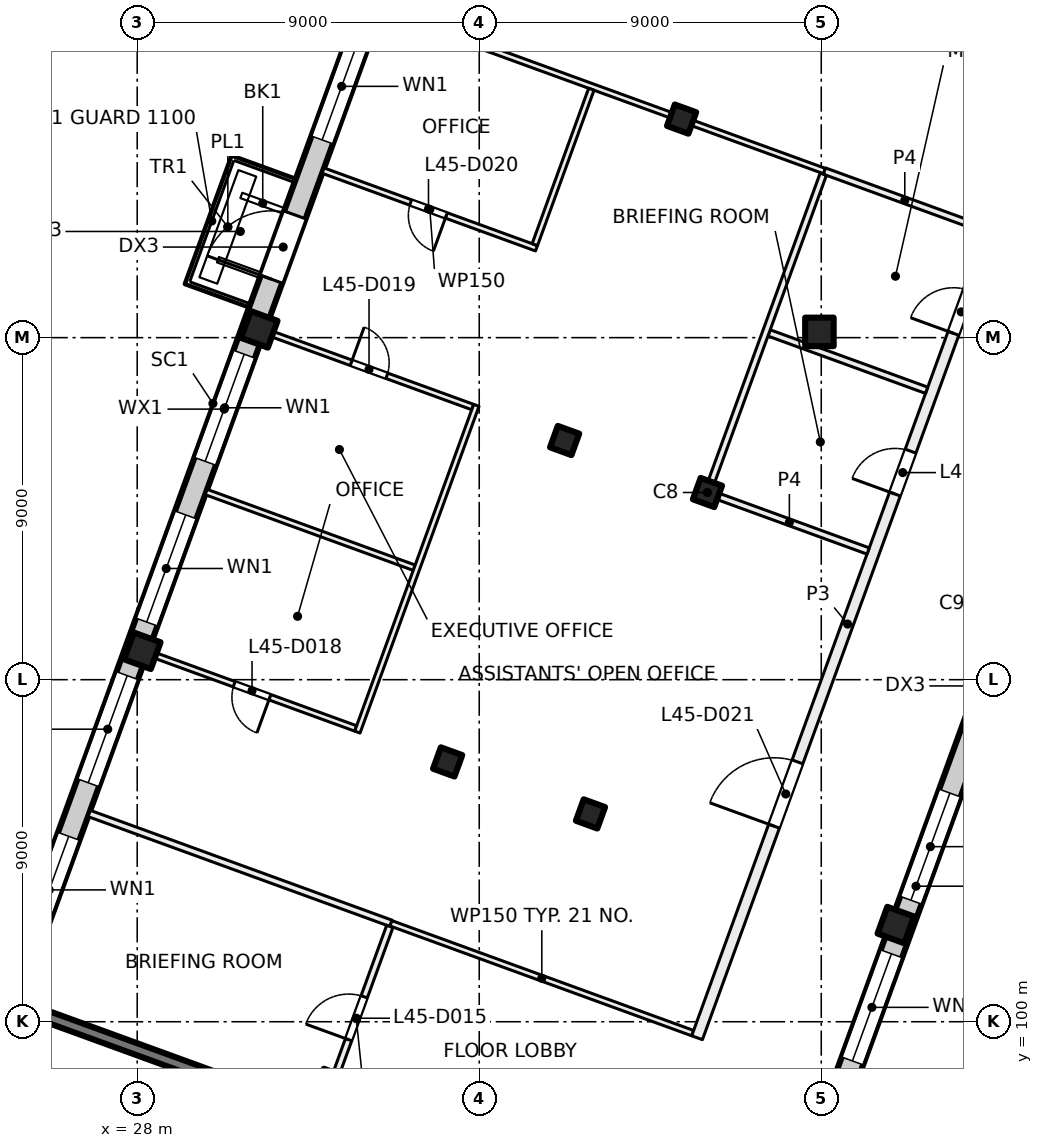
"""IFC4 building model, lengths in metres.
Left out: names, types, materials, properties, quantities, classifications, styles, units other than length and angle.
Written with IfcOpenShell. Run it as: python <this file> out.ifc"""

import sys

from ifc_helpers import new_model, si_unit, direction, frame, frame_2d, origin, origin_2d, place, context, subcontext, project, spatial, rectangle, extrude, element, fill, save


model = new_model("IFC4")
c1 = context("Model", 3, precision=1e-05, world=origin(), true_north=direction((0.0, 1.0)))
c2 = subcontext(c1, "Body", "Model", "MODEL_VIEW")
j1 = project(units=[si_unit("LENGTHUNIT", "METRE"), si_unit("PLANEANGLEUNIT", "RADIAN")], contexts=[c1])
p1 = place(None, origin())
s1 = spatial("IfcSite", under=j1, at=p1, CompositionType="ELEMENT")
p2 = place(p1, origin())
s2 = spatial("IfcBuilding", under=s1, at=p2, CompositionType="ELEMENT")
p3 = place(p2, frame((0.0, 0.0, 192.0)))
s3 = spatial("IfcBuildingStorey", under=s2, at=p3, CompositionType="ELEMENT", Elevation=192.0)
p4 = place(p3, frame((45.952, 118.152, 0.0), z_axis=(0.0, 0.0, 1.0), x_axis=(1.0, 0.0, 0.0)))
e1 = element("IfcColumn", 1, at=p4, inside=s3, PredefinedType="COLUMN", context=c2, shape_type="SweptSolid", body=[
    extrude(rectangle(XDim=0.75, YDim=0.75, at=origin_2d()), origin(), (0.0, 0.0, 1.0), 4.0),
])
for number, where, z_axis, x_axis in (
    (2, (43.006, 113.925, 0.0), (0.0, 0.0, 1.0), (-0.342, -0.94, 0.0)),
    (3, (39.927, 105.468, 0.0), (0.0, 0.0, 1.0), (-0.342, -0.94, 0.0)),
    (4, (42.325, 123.751, 0.0), (0.0, 0.0, 1.0), (-0.342, -0.94, 0.0)),
    (5, (39.247, 115.293, 0.0), (0.0, 0.0, 1.0), (-0.342, -0.94, 0.0)),
    (6, (36.169, 106.836, 0.0), (0.0, 0.0, 1.0), (-0.342, -0.94, 0.0)),
):
    element("IfcColumn", number, at=place(p3, frame(where, z_axis=z_axis, x_axis=x_axis)), inside=s3, PredefinedType="COLUMN", context=c2, shape_type="SweptSolid", body=[
        extrude(rectangle(XDim=0.6, YDim=0.6, at=origin_2d()), origin(), (0.0, 0.0, 1.0), 4.0),
    ])
for number, where, z_axis, x_axis in (
    (7, (47.962, 102.544, 0.0), (0.0, 0.0, 1.0), (-0.342, -0.94, 0.0)),
    (8, (31.212, 118.218, 0.0), (0.0, 0.0, 1.0), (-0.342, -0.94, 0.0)),
    (9, (28.134, 109.76, 0.0), (0.0, 0.0, 1.0), (-0.342, -0.94, 0.0)),
):
    element("IfcColumn", number, at=place(p3, frame(where, z_axis=z_axis, x_axis=x_axis)), inside=s3, PredefinedType="COLUMN", context=c2, shape_type="SweptSolid", body=[
        extrude(rectangle(XDim=0.75, YDim=0.75, at=origin_2d()), origin(), (0.0, 0.0, 1.0), 4.0),
    ])
p5 = place(p3, frame((32.971, 97.465, 0.0), z_axis=(0.0, 0.0, 1.0), x_axis=(-0.939695066972, 0.34201342241, 0.0)))
e10 = element("IfcWall", 10, at=p5, inside=s3, PredefinedType="SHEAR", context=c2, shape_type="SweptSolid", body=[
    extrude(rectangle(XDim=8.7, YDim=0.3, at=frame_2d((4.35, 0.0))), origin(), (0.0, 0.0, 1.0), 4.0),
])
p6 = place(p3, frame((52.212, 113.783, 0.0), z_axis=(0.0, 0.0, 1.0), x_axis=(-0.34202521188, -0.939690775968, 0.0)))
e11 = element("IfcWall", 11, at=p6, inside=s3, PredefinedType="SOLIDWALL", context=c2, shape_type="SweptSolid", body=[
    extrude(rectangle(XDim=21.745, YDim=0.6, at=frame_2d((10.873, 0.0))), origin(), (0.0, 0.0, 1.0), 3.625),
])
p7 = place(p6, frame((4.365, 0.0, 0.0)))
e12 = element("IfcOpeningElement", 12, at=p7, cuts=e11, PredefinedType="OPENING", context=c2, shape_type="SweptSolid", body=[
    extrude(rectangle(XDim=1.8, YDim=2.4, at=frame_2d((0.9, 1.2))), frame((0.0, 0.31, 0.0), z_axis=(0.0, -1.0, 0.0), x_axis=(1.0, 0.0, 0.0)), (0.0, 0.0, 1.0), 0.62),
])
p8 = place(p6, frame((8.265, 0.0, 0.9)))
e13 = element("IfcOpeningElement", 13, at=p8, cuts=e11, PredefinedType="OPENING", context=c2, shape_type="SweptSolid", body=[
    extrude(rectangle(XDim=3.0, YDim=2.4, at=frame_2d((1.5, 1.2))), frame((0.0, 0.31, 0.0), z_axis=(0.0, -1.0, 0.0), x_axis=(1.0, 0.0, 0.0)), (0.0, 0.0, 1.0), 0.62),
])
p9 = place(p6, frame((12.765, 0.0, 0.9)))
e14 = element("IfcOpeningElement", 14, at=p9, cuts=e11, PredefinedType="OPENING", context=c2, shape_type="SweptSolid", body=[
    extrude(rectangle(XDim=3.0, YDim=2.4, at=frame_2d((1.5, 1.2))), frame((0.0, 0.31, 0.0), z_axis=(0.0, -1.0, 0.0), x_axis=(1.0, 0.0, 0.0)), (0.0, 0.0, 1.0), 0.62),
])
p10 = place(p6, frame((17.265, 0.0, 0.9)))
e15 = element("IfcOpeningElement", 15, at=p10, cuts=e11, PredefinedType="OPENING", context=c2, shape_type="SweptSolid", body=[
    extrude(rectangle(XDim=3.0, YDim=2.4, at=frame_2d((1.5, 1.2))), frame((0.0, 0.31, 0.0), z_axis=(0.0, -1.0, 0.0), x_axis=(1.0, 0.0, 0.0)), (0.0, 0.0, 1.0), 0.62),
])
p11 = place(p3, frame((24.666, 100.669, 0.0), z_axis=(0.0, 0.0, 1.0), x_axis=(0.34201964167, 0.939692803373, 0.0)))
e16 = element("IfcWall", 16, at=p11, inside=s3, PredefinedType="SOLIDWALL", context=c2, shape_type="SweptSolid", body=[
    extrude(rectangle(XDim=32.884, YDim=0.6, at=frame_2d((16.442, 0.0))), origin(), (0.0, 0.0, 1.0), 3.625),
])
p12 = place(p11, frame((1.48, 0.0, 0.9)))
e17 = element("IfcOpeningElement", 17, at=p12, cuts=e16, PredefinedType="OPENING", context=c2, shape_type="SweptSolid", body=[
    extrude(rectangle(XDim=3.0, YDim=2.4, at=frame_2d((1.5, 1.2))), frame((0.0, 0.31, 0.0), z_axis=(0.0, -1.0, 0.0), x_axis=(1.0, 0.0, 0.0)), (0.0, 0.0, 1.0), 0.62),
])
p13 = place(p11, frame((5.98, 0.0, 0.9)))
e18 = element("IfcOpeningElement", 18, at=p13, cuts=e16, PredefinedType="OPENING", context=c2, shape_type="SweptSolid", body=[
    extrude(rectangle(XDim=3.0, YDim=2.4, at=frame_2d((1.5, 1.2))), frame((0.0, 0.31, 0.0), z_axis=(0.0, -1.0, 0.0), x_axis=(1.0, 0.0, 0.0)), (0.0, 0.0, 1.0), 0.62),
])
p14 = place(p11, frame((10.48, 0.0, 0.9)))
e19 = element("IfcOpeningElement", 19, at=p14, cuts=e16, PredefinedType="OPENING", context=c2, shape_type="SweptSolid", body=[
    extrude(rectangle(XDim=3.0, YDim=2.4, at=frame_2d((1.5, 1.2))), frame((0.0, 0.31, 0.0), z_axis=(0.0, -1.0, 0.0), x_axis=(1.0, 0.0, 0.0)), (0.0, 0.0, 1.0), 0.62),
])
p15 = place(p11, frame((14.98, 0.0, 0.9)))
e20 = element("IfcOpeningElement", 20, at=p15, cuts=e16, PredefinedType="OPENING", context=c2, shape_type="SweptSolid", body=[
    extrude(rectangle(XDim=3.0, YDim=2.4, at=frame_2d((1.5, 1.2))), frame((0.0, 0.31, 0.0), z_axis=(0.0, -1.0, 0.0), x_axis=(1.0, 0.0, 0.0)), (0.0, 0.0, 1.0), 0.62),
])
p16 = place(p11, frame((20.08, 0.0, 0.0)))
e21 = element("IfcOpeningElement", 21, at=p16, cuts=e16, PredefinedType="OPENING", context=c2, shape_type="SweptSolid", body=[
    extrude(rectangle(XDim=1.8, YDim=2.4, at=frame_2d((0.9, 1.2))), frame((0.0, 0.31, 0.0), z_axis=(0.0, -1.0, 0.0), x_axis=(1.0, 0.0, 0.0)), (0.0, 0.0, 1.0), 0.62),
])
p17 = place(p11, frame((23.98, 0.0, 0.9)))
e22 = element("IfcOpeningElement", 22, at=p17, cuts=e16, PredefinedType="OPENING", context=c2, shape_type="SweptSolid", body=[
    extrude(rectangle(XDim=3.0, YDim=2.4, at=frame_2d((1.5, 1.2))), frame((0.0, 0.31, 0.0), z_axis=(0.0, -1.0, 0.0), x_axis=(1.0, 0.0, 0.0)), (0.0, 0.0, 1.0), 0.62),
])
p18 = place(p11, frame((28.48, 0.0, 0.9)))
e23 = element("IfcOpeningElement", 23, at=p18, cuts=e16, PredefinedType="OPENING", context=c2, shape_type="SweptSolid", body=[
    extrude(rectangle(XDim=3.0, YDim=2.4, at=frame_2d((1.5, 1.2))), frame((0.0, 0.31, 0.0), z_axis=(0.0, -1.0, 0.0), x_axis=(1.0, 0.0, 0.0)), (0.0, 0.0, 1.0), 0.62),
])
p19 = place(p3, frame((26.736, 105.48, 0.0), z_axis=(0.0, 0.0, 1.0), x_axis=(0.939706509432, -0.341981982173, 0.0)))
e24 = element("IfcWall", 24, at=p19, inside=s3, PredefinedType="PARTITIONING", context=c2, shape_type="SweptSolid", body=[
    extrude(rectangle(XDim=8.45, YDim=0.175, at=frame_2d((4.225, 0.0))), origin(), (0.0, 0.0, 1.0), 3.625),
])
p20 = place(p3, frame((29.814, 113.938, 0.0), z_axis=(0.0, 0.0, 1.0), x_axis=(0.939738354986, -0.341894463495, 0.0)))
e25 = element("IfcWall", 25, at=p20, inside=s3, PredefinedType="PARTITIONING", context=c2, shape_type="SweptSolid", body=[
    extrude(rectangle(XDim=5.826, YDim=0.15, at=frame_2d((2.913, 0.0))), origin(), (0.0, 0.0, 1.0), 3.625),
])
p21 = place(p3, frame((31.353, 118.166, 0.0), z_axis=(0.0, 0.0, 1.0), x_axis=(0.939733456466, -0.341907927371, 0.0)))
e26 = element("IfcWall", 26, at=p21, inside=s3, PredefinedType="PARTITIONING", context=c2, shape_type="SweptSolid", body=[
    extrude(rectangle(XDim=5.826, YDim=0.15, at=frame_2d((2.913, 0.0))), origin(), (0.0, 0.0, 1.0), 3.625),
])
p22 = place(p21, frame((2.423, 0.0, 0.0)))
e27 = element("IfcOpeningElement", 27, at=p22, cuts=e26, PredefinedType="OPENING", context=c2, shape_type="SweptSolid", body=[
    extrude(rectangle(XDim=1.0, YDim=2.1, at=frame_2d((0.5, 1.05))), frame((0.0, 0.085, 0.0), z_axis=(0.0, -1.0, 0.0), x_axis=(1.0, 0.0, 0.0)), (0.0, 0.0, 1.0), 0.17),
])
p23 = place(p3, frame((33.749, 107.717, 0.0), z_axis=(0.0, 0.0, 1.0), x_axis=(-0.939718757431, 0.341948324943, 0.0)))
e28 = element("IfcWall", 28, at=p23, inside=s3, PredefinedType="PARTITIONING", context=c2, shape_type="SweptSolid", body=[
    extrude(rectangle(XDim=5.825, YDim=0.15, at=frame_2d((2.913, 0.0))), origin(), (0.0, 0.0, 1.0), 3.625),
])
p24 = place(p23, frame((2.403, 0.0, 0.0)))
e29 = element("IfcOpeningElement", 29, at=p24, cuts=e28, PredefinedType="OPENING", context=c2, shape_type="SweptSolid", body=[
    extrude(rectangle(XDim=1.0, YDim=2.1, at=frame_2d((0.5, 1.05))), frame((0.0, 0.085, 0.0), z_axis=(0.0, -1.0, 0.0), x_axis=(1.0, 0.0, 0.0)), (0.0, 0.0, 1.0), 0.17),
])
p25 = place(p3, frame((36.924, 116.218, 0.0), z_axis=(0.0, 0.0, 1.0), x_axis=(-0.342220796767, -0.939619564643, 0.0)))
e30 = element("IfcWall", 30, at=p25, inside=s3, PredefinedType="PARTITIONING", context=c2, shape_type="SweptSolid", body=[
    extrude(rectangle(XDim=9.149, YDim=0.15, at=frame_2d((4.575, 0.0))), origin(), (0.0, 0.0, 1.0), 3.625),
])
p26 = place(p3, frame((34.431, 126.624, 0.0), z_axis=(0.0, 0.0, 1.0), x_axis=(0.939703144457, -0.341991228392, 0.0)))
e31 = element("IfcWall", 31, at=p26, inside=s3, PredefinedType="PARTITIONING", context=c2, shape_type="SweptSolid", body=[
    extrude(rectangle(XDim=12.401, YDim=0.15, at=frame_2d((6.2, 0.0))), origin(), (0.0, 0.0, 1.0), 3.625),
])
p27 = place(p3, frame((32.881, 97.657, 0.0), z_axis=(0.0, 0.0, 1.0), x_axis=(0.342058204353, 0.939678766832, 0.0)))
e32 = element("IfcWall", 32, at=p27, inside=s3, PredefinedType="PARTITIONING", context=c2, shape_type="SweptSolid", body=[
    extrude(rectangle(XDim=5.163, YDim=0.175, at=frame_2d((2.581, 0.0))), origin(), (0.0, 0.0, 1.0), 3.625),
])
p28 = place(p27, frame((1.991, 0.0, 0.0)))
e33 = element("IfcOpeningElement", 33, at=p28, cuts=e32, PredefinedType="OPENING", context=c2, shape_type="SweptSolid", body=[
    extrude(rectangle(XDim=1.2, YDim=2.1, at=frame_2d((0.6, 1.05))), frame((0.0, 0.097, 0.0), z_axis=(0.0, -1.0, 0.0), x_axis=(1.0, 0.0, 0.0)), (0.0, 0.0, 1.0), 0.195),
])
p29 = place(p3, frame((34.677, 102.59, 0.0), z_axis=(0.0, 0.0, 1.0), x_axis=(0.939683705252, -0.342044637561, 0.0)))
e34 = element("IfcWall", 34, at=p29, inside=s3, PredefinedType="PARTITIONING", context=c2, shape_type="SweptSolid", body=[
    extrude(rectangle(XDim=8.45, YDim=0.15, at=frame_2d((4.225, 0.0))), origin(), (0.0, 0.0, 1.0), 3.625),
])
p30 = place(p3, frame((38.507, 120.351, 0.0), z_axis=(0.0, 0.0, 1.0), x_axis=(-0.939678850769, 0.342057973766, 0.0)))
e35 = element("IfcWall", 35, at=p30, inside=s3, PredefinedType="PARTITIONING", context=c2, shape_type="SweptSolid", body=[
    extrude(rectangle(XDim=5.975, YDim=0.15, at=frame_2d((2.988, 0.0))), origin(), (0.0, 0.0, 1.0), 3.625),
])
p31 = place(p30, frame((2.525, 0.0, 0.0)))
e36 = element("IfcOpeningElement", 36, at=p31, cuts=e35, PredefinedType="OPENING", context=c2, shape_type="SweptSolid", body=[
    extrude(rectangle(XDim=1.0, YDim=2.1, at=frame_2d((0.5, 1.05))), frame((0.0, 0.085, 0.0), z_axis=(0.0, -1.0, 0.0), x_axis=(1.0, 0.0, 0.0)), (0.0, 0.0, 1.0), 0.17),
])
p32 = place(p3, frame((39.95, 124.536, 0.0), z_axis=(0.0, 0.0, 1.0), x_axis=(-0.341783611499, -0.939778677621, 0.0)))
e37 = element("IfcWall", 37, at=p32, inside=s3, PredefinedType="PARTITIONING", context=c2, shape_type="SweptSolid", body=[
    extrude(rectangle(XDim=4.351, YDim=0.15, at=frame_2d((2.175, 0.0))), origin(), (0.0, 0.0, 1.0), 3.625),
])
p33 = place(p3, frame((42.732, 99.579, 0.0), z_axis=(0.0, 0.0, 1.0), x_axis=(0.342053589012, 0.939680446877, 0.0)))
e38 = element("IfcWall", 38, at=p33, inside=s3, PredefinedType="PARTITIONING", context=c2, shape_type="SweptSolid", body=[
    extrude(rectangle(XDim=23.166, YDim=0.3, at=frame_2d((11.583, 0.0))), origin(), (0.0, 0.0, 1.0), 3.625),
])
p34 = place(p33, frame((15.225, 0.0, 0.0)))
e39 = element("IfcOpeningElement", 39, at=p34, cuts=e38, PredefinedType="OPENING", context=c2, shape_type="SweptSolid", body=[
    extrude(rectangle(XDim=1.2, YDim=2.1, at=frame_2d((0.6, 1.05))), frame((0.0, 0.16, 0.0), z_axis=(0.0, -1.0, 0.0), x_axis=(1.0, 0.0, 0.0)), (0.0, 0.0, 1.0), 0.32),
])
p35 = place(p33, frame((19.725, 0.0, 0.0)))
e40 = element("IfcOpeningElement", 40, at=p35, cuts=e38, PredefinedType="OPENING", context=c2, shape_type="SweptSolid", body=[
    extrude(rectangle(XDim=1.2, YDim=2.1, at=frame_2d((0.6, 1.05))), frame((0.0, 0.16, 0.0), z_axis=(0.0, -1.0, 0.0), x_axis=(1.0, 0.0, 0.0)), (0.0, 0.0, 1.0), 0.32),
])
p36 = place(p33, frame((5.925, 0.0, 0.0)))
e41 = element("IfcOpeningElement", 41, at=p36, cuts=e38, PredefinedType="OPENING", context=c2, shape_type="SweptSolid", body=[
    extrude(rectangle(XDim=1.8, YDim=2.1, at=frame_2d((0.9, 1.05))), frame((0.0, 0.16, 0.0), z_axis=(0.0, -1.0, 0.0), x_axis=(1.0, 0.0, 0.0)), (0.0, 0.0, 1.0), 0.32),
])
for number, where, z_axis, x_axis in (
    (42, (43.088, 113.895, 0.0), (0.0, 0.0, 1.0), (0.94, -0.342, 0.0)),
    (43, (44.627, 118.124, 0.0), (0.0, 0.0, 1.0), (0.94, -0.342, 0.0)),
):
    element("IfcWall", number, at=place(p3, frame(where, z_axis=z_axis, x_axis=x_axis)), inside=s3, PredefinedType="PARTITIONING", context=c2, shape_type="SweptSolid", body=[
        extrude(rectangle(XDim=4.412, YDim=0.175, at=frame_2d((2.206, 0.0))), origin(), (0.0, 0.0, 1.0), 3.625),
    ])
p37 = place(p3, frame((46.054, 122.301, 0.0), z_axis=(0.0, 0.0, 1.0), x_axis=(-0.341963022424, -0.939713409128, 0.0)))
e44 = element("IfcWall", 44, at=p37, inside=s3, PredefinedType="PARTITIONING", context=c2, shape_type="SweptSolid", body=[
    extrude(rectangle(XDim=9.001, YDim=0.175, at=frame_2d((4.5, 0.0))), origin(), (0.0, 0.0, 1.0), 3.625),
])
p38 = place(p3, frame((50.312, 120.843, 0.0), z_axis=(0.0, 0.0, 1.0), x_axis=(-0.939609529273, 0.342248349154, 0.0)))
e45 = element("IfcWall", 45, at=p38, inside=s3, PredefinedType="PARTITIONING", context=c2, shape_type="SweptSolid", body=[
    extrude(rectangle(XDim=4.5, YDim=0.175, at=frame_2d((2.25, 0.0))), origin(), (0.0, 0.0, 1.0), 3.625),
])
p39 = place(p8, origin())
e46 = element("IfcWindow", 46, at=p39, inside=s3, PartitioningType="SINGLE_PANEL", PredefinedType="WINDOW", context=c2, shape_type="SweptSolid", body=[
    extrude(rectangle(XDim=3.0, YDim=2.4, at=frame_2d((1.5, 1.2))), frame((0.0, 0.03, 0.0), z_axis=(0.0, -1.0, 0.0), x_axis=(1.0, 0.0, 0.0)), (0.0, 0.0, 1.0), 0.06),
])
fill(e13, e46)
p40 = place(p9, origin())
e47 = element("IfcWindow", 47, at=p40, inside=s3, PartitioningType="SINGLE_PANEL", PredefinedType="WINDOW", context=c2, shape_type="SweptSolid", body=[
    extrude(rectangle(XDim=3.0, YDim=2.4, at=frame_2d((1.5, 1.2))), frame((0.0, 0.03, 0.0), z_axis=(0.0, -1.0, 0.0), x_axis=(1.0, 0.0, 0.0)), (0.0, 0.0, 1.0), 0.06),
])
fill(e14, e47)
p41 = place(p12, origin())
e48 = element("IfcWindow", 48, at=p41, inside=s3, PartitioningType="SINGLE_PANEL", PredefinedType="WINDOW", context=c2, shape_type="SweptSolid", body=[
    extrude(rectangle(XDim=3.0, YDim=2.4, at=frame_2d((1.5, 1.2))), frame((0.0, 0.03, 0.0), z_axis=(0.0, -1.0, 0.0), x_axis=(1.0, 0.0, 0.0)), (0.0, 0.0, 1.0), 0.06),
])
fill(e17, e48)
p42 = place(p13, origin())
e49 = element("IfcWindow", 49, at=p42, inside=s3, PartitioningType="SINGLE_PANEL", PredefinedType="WINDOW", context=c2, shape_type="SweptSolid", body=[
    extrude(rectangle(XDim=3.0, YDim=2.4, at=frame_2d((1.5, 1.2))), frame((0.0, 0.03, 0.0), z_axis=(0.0, -1.0, 0.0), x_axis=(1.0, 0.0, 0.0)), (0.0, 0.0, 1.0), 0.06),
])
fill(e18, e49)
p43 = place(p14, origin())
e50 = element("IfcWindow", 50, at=p43, inside=s3, PartitioningType="SINGLE_PANEL", PredefinedType="WINDOW", context=c2, shape_type="SweptSolid", body=[
    extrude(rectangle(XDim=3.0, YDim=2.4, at=frame_2d((1.5, 1.2))), frame((0.0, 0.03, 0.0), z_axis=(0.0, -1.0, 0.0), x_axis=(1.0, 0.0, 0.0)), (0.0, 0.0, 1.0), 0.06),
])
fill(e19, e50)
p44 = place(p15, origin())
e51 = element("IfcWindow", 51, at=p44, inside=s3, PartitioningType="SINGLE_PANEL", PredefinedType="WINDOW", context=c2, shape_type="SweptSolid", body=[
    extrude(rectangle(XDim=3.0, YDim=2.4, at=frame_2d((1.5, 1.2))), frame((0.0, 0.03, 0.0), z_axis=(0.0, -1.0, 0.0), x_axis=(1.0, 0.0, 0.0)), (0.0, 0.0, 1.0), 0.06),
])
fill(e20, e51)
p45 = place(p16, origin())
e52 = element("IfcDoor", 52, at=p45, inside=s3, OperationType="DOUBLE_DOOR_SINGLE_SWING", PredefinedType="DOOR", context=c2, shape_type="SweptSolid", body=[
    extrude(rectangle(XDim=1.8, YDim=2.4, at=frame_2d((0.9, 1.2))), frame((0.0, 0.025, 0.0), z_axis=(0.0, -1.0, 0.0), x_axis=(1.0, 0.0, 0.0)), (0.0, 0.0, 1.0), 0.05),
])
fill(e21, e52)
p46 = place(p17, origin())
e53 = element("IfcWindow", 53, at=p46, inside=s3, PartitioningType="SINGLE_PANEL", PredefinedType="WINDOW", context=c2, shape_type="SweptSolid", body=[
    extrude(rectangle(XDim=3.0, YDim=2.4, at=frame_2d((1.5, 1.2))), frame((0.0, 0.03, 0.0), z_axis=(0.0, -1.0, 0.0), x_axis=(1.0, 0.0, 0.0)), (0.0, 0.0, 1.0), 0.06),
])
fill(e22, e53)
p47 = place(p28, origin())
e54 = element("IfcDoor", 54, at=p47, inside=s3, OperationType="DOUBLE_DOOR_SINGLE_SWING", PredefinedType="DOOR", context=c2, shape_type="SweptSolid", body=[
    extrude(rectangle(XDim=1.2, YDim=2.1, at=frame_2d((0.6, 1.05))), frame((0.0, 0.025, 0.0), z_axis=(0.0, -1.0, 0.0), x_axis=(1.0, 0.0, 0.0)), (0.0, 0.0, 1.0), 0.05),
])
fill(e33, e54)
p48 = place(p34, origin())
e55 = element("IfcDoor", 55, at=p48, inside=s3, OperationType="DOUBLE_DOOR_SINGLE_SWING", PredefinedType="DOOR", context=c2, shape_type="SweptSolid", body=[
    extrude(rectangle(XDim=1.2, YDim=2.1, at=frame_2d((0.6, 1.05))), frame((0.0, 0.025, 0.0), z_axis=(0.0, -1.0, 0.0), x_axis=(1.0, 0.0, 0.0)), (0.0, 0.0, 1.0), 0.05),
])
fill(e39, e55)
p49 = place(p35, origin())
e56 = element("IfcDoor", 56, at=p49, inside=s3, OperationType="DOUBLE_DOOR_SINGLE_SWING", PredefinedType="DOOR", context=c2, shape_type="SweptSolid", body=[
    extrude(rectangle(XDim=1.2, YDim=2.1, at=frame_2d((0.6, 1.05))), frame((0.0, 0.025, 0.0), z_axis=(0.0, -1.0, 0.0), x_axis=(1.0, 0.0, 0.0)), (0.0, 0.0, 1.0), 0.05),
])
fill(e40, e56)
p50 = place(p24, origin())
e57 = element("IfcDoor", 57, at=p50, inside=s3, OperationType="SINGLE_SWING_LEFT", PredefinedType="DOOR", context=c2, shape_type="SweptSolid", body=[
    extrude(rectangle(XDim=1.0, YDim=2.1, at=frame_2d((0.5, 1.05))), frame((0.0, 0.025, 0.0), z_axis=(0.0, -1.0, 0.0), x_axis=(1.0, 0.0, 0.0)), (0.0, 0.0, 1.0), 0.05),
])
fill(e29, e57)
p51 = place(p22, origin())
e58 = element("IfcDoor", 58, at=p51, inside=s3, OperationType="SINGLE_SWING_LEFT", PredefinedType="DOOR", context=c2, shape_type="SweptSolid", body=[
    extrude(rectangle(XDim=1.0, YDim=2.1, at=frame_2d((0.5, 1.05))), frame((0.0, 0.025, 0.0), z_axis=(0.0, -1.0, 0.0), x_axis=(1.0, 0.0, 0.0)), (0.0, 0.0, 1.0), 0.05),
])
fill(e27, e58)
p52 = place(p31, origin())
e59 = element("IfcDoor", 59, at=p52, inside=s3, OperationType="SINGLE_SWING_LEFT", PredefinedType="DOOR", context=c2, shape_type="SweptSolid", body=[
    extrude(rectangle(XDim=1.0, YDim=2.1, at=frame_2d((0.5, 1.05))), frame((0.0, 0.025, 0.0), z_axis=(0.0, -1.0, 0.0), x_axis=(1.0, 0.0, 0.0)), (0.0, 0.0, 1.0), 0.05),
])
fill(e36, e59)
p53 = place(p36, origin())
e60 = element("IfcDoor", 60, at=p53, inside=s3, OperationType="DOUBLE_DOOR_SINGLE_SWING", PredefinedType="DOOR", context=c2, shape_type="SweptSolid", body=[
    extrude(rectangle(XDim=1.8, YDim=2.1, at=frame_2d((0.9, 1.05))), frame((0.0, 0.025, 0.0), z_axis=(0.0, -1.0, 0.0), x_axis=(1.0, 0.0, 0.0)), (0.0, 0.0, 1.0), 0.05),
])
fill(e41, e60)
save(model, sys.argv[1])
